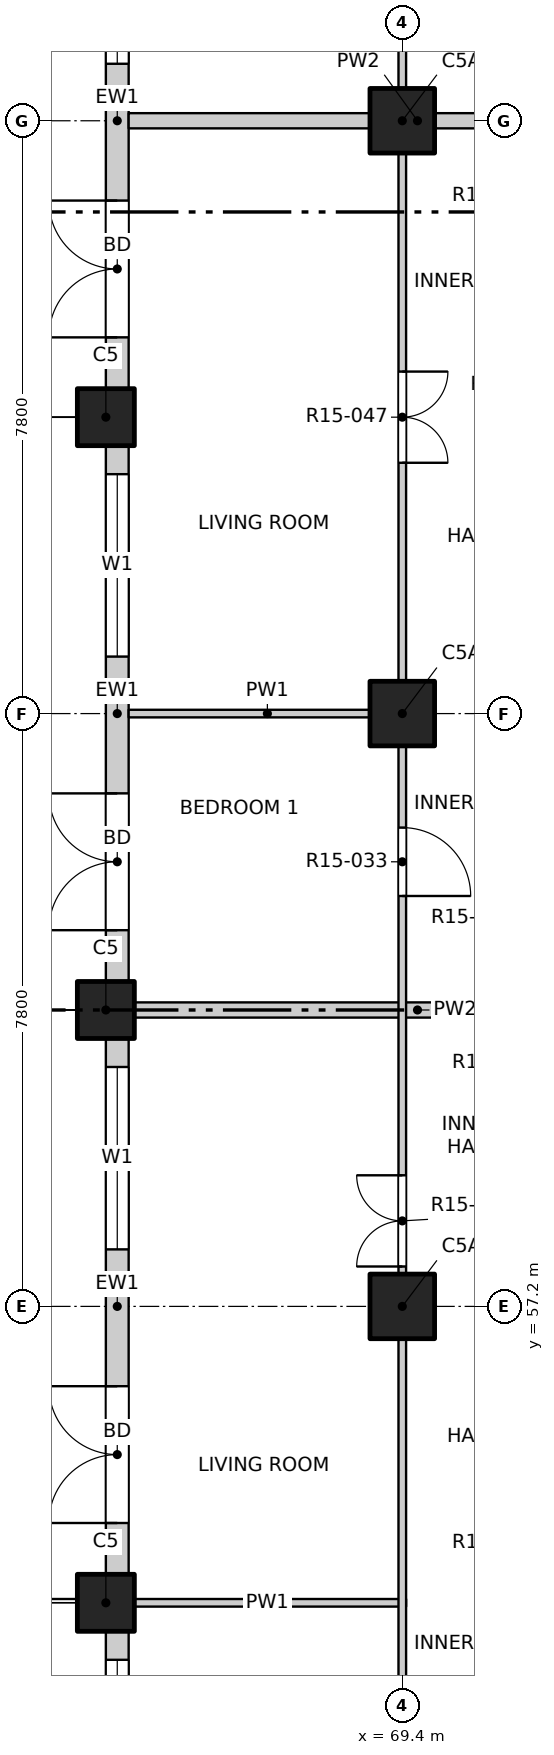
"""IFC4 building model, lengths in metres.
Left out: names, types, materials, properties, quantities, classifications, styles, units other than length and angle.
Written with IfcOpenShell. Run it as: python <this file> out.ifc"""

import sys

from ifc_helpers import new_model, si_unit, direction, frame, frame_2d, origin, origin_2d, place, context, subcontext, project, spatial, rectangle, extrude, element, fill, save


model = new_model("IFC4")
c1 = context("Model", 3, precision=1e-05, world=origin(), true_north=direction((0.0, 1.0)))
c2 = subcontext(c1, "Body", "Model", "MODEL_VIEW")
j1 = project(units=[si_unit("LENGTHUNIT", "METRE"), si_unit("PLANEANGLEUNIT", "RADIAN")], contexts=[c1])
p1 = place(None, origin())
s1 = spatial("IfcSite", under=j1, at=p1, CompositionType="ELEMENT")
p2 = place(p1, origin())
s2 = spatial("IfcBuilding", under=s1, at=p2, CompositionType="ELEMENT")
p3 = place(p2, frame((0.0, 0.0, 158.8)))
s3 = spatial("IfcBuildingStorey", under=s2, at=p3, CompositionType="ELEMENT", Elevation=158.8)
for number, where, z_axis, x_axis in (
    (1, (65.5, 53.3, -0.25), (0.0, 0.0, 1.0), (1.0, 0.0, 0.0)),
    (2, (65.5, 61.1, -0.25), (0.0, 0.0, 1.0), (1.0, 0.0, 0.0)),
    (3, (65.5, 68.9, -0.25), (0.0, 0.0, 1.0), (1.0, 0.0, 0.0)),
):
    element("IfcColumn", number, at=place(p3, frame(where, z_axis=z_axis, x_axis=x_axis)), inside=s3, PredefinedType="COLUMN", context=c2, shape_type="SweptSolid", body=[
        extrude(rectangle(XDim=0.75, YDim=0.75, at=origin_2d()), origin(), (0.0, 0.0, 1.0), 3.4),
    ])
for number, where, z_axis, x_axis in (
    (4, (69.4, 57.2, -0.25), (0.0, 0.0, 1.0), (1.0, 0.0, 0.0)),
    (5, (69.4, 65.0, -0.25), (0.0, 0.0, 1.0), (1.0, 0.0, 0.0)),
    (6, (69.4, 72.8, -0.25), (0.0, 0.0, 1.0), (1.0, 0.0, 0.0)),
):
    element("IfcColumn", number, at=place(p3, frame(where, z_axis=z_axis, x_axis=x_axis)), inside=s3, PredefinedType="COLUMN", context=c2, shape_type="SweptSolid", body=[
        extrude(rectangle(XDim=0.85, YDim=0.85, at=origin_2d()), origin(), (0.0, 0.0, 1.0), 3.4),
    ])
p4 = place(p3, frame((65.65, 49.4, 0.0), z_axis=(0.0, 0.0, 1.0), x_axis=(0.0, 1.0, 0.0)))
e7 = element("IfcWall", 7, at=p4, inside=s3, PredefinedType="SOLIDWALL", context=c2, shape_type="SweptSolid", body=[
    extrude(rectangle(XDim=3.525, YDim=0.3, at=frame_2d((1.763, 0.0))), origin(), (0.0, 0.0, 1.0), 2.7),
])
p5 = place(p4, frame((0.75, 0.0, 0.9)))
e8 = element("IfcOpeningElement", 8, at=p5, cuts=e7, PredefinedType="OPENING", context=c2, shape_type="SweptSolid", body=[
    extrude(rectangle(XDim=2.4, YDim=1.8, at=frame_2d((1.2, 0.9))), frame((0.0, 0.16, 0.0), z_axis=(0.0, -1.0, 0.0), x_axis=(1.0, 0.0, 0.0)), (0.0, 0.0, 1.0), 0.32),
])
p6 = place(p3, frame((65.65, 53.675, 0.0), z_axis=(0.0, 0.0, 1.0), x_axis=(0.0, 1.0, 0.0)))
e9 = element("IfcWall", 9, at=p6, inside=s3, PredefinedType="SOLIDWALL", context=c2, shape_type="SweptSolid", body=[
    extrude(rectangle(XDim=7.05, YDim=0.3, at=frame_2d((3.525, 0.0))), origin(), (0.0, 0.0, 1.0), 2.7),
])
p7 = place(p6, frame((0.675, 0.0, 0.0)))
e10 = element("IfcOpeningElement", 10, at=p7, cuts=e9, PredefinedType="OPENING", context=c2, shape_type="SweptSolid", body=[
    extrude(rectangle(XDim=1.8, YDim=2.4, at=frame_2d((0.9, 1.2))), frame((0.0, 0.16, 0.0), z_axis=(0.0, -1.0, 0.0), x_axis=(1.0, 0.0, 0.0)), (0.0, 0.0, 1.0), 0.32),
])
p8 = place(p6, frame((4.275, 0.0, 0.9)))
e11 = element("IfcOpeningElement", 11, at=p8, cuts=e9, PredefinedType="OPENING", context=c2, shape_type="SweptSolid", body=[
    extrude(rectangle(XDim=2.4, YDim=1.8, at=frame_2d((1.2, 0.9))), frame((0.0, 0.16, 0.0), z_axis=(0.0, -1.0, 0.0), x_axis=(1.0, 0.0, 0.0)), (0.0, 0.0, 1.0), 0.32),
])
p9 = place(p3, frame((65.65, 61.475, 0.0), z_axis=(0.0, 0.0, 1.0), x_axis=(0.0, 1.0, 0.0)))
e12 = element("IfcWall", 12, at=p9, inside=s3, PredefinedType="SOLIDWALL", context=c2, shape_type="SweptSolid", body=[
    extrude(rectangle(XDim=7.05, YDim=0.3, at=frame_2d((3.525, 0.0))), origin(), (0.0, 0.0, 1.0), 2.7),
])
p10 = place(p9, frame((0.675, 0.0, 0.0)))
e13 = element("IfcOpeningElement", 13, at=p10, cuts=e12, PredefinedType="OPENING", context=c2, shape_type="SweptSolid", body=[
    extrude(rectangle(XDim=1.8, YDim=2.4, at=frame_2d((0.9, 1.2))), frame((0.0, 0.16, 0.0), z_axis=(0.0, -1.0, 0.0), x_axis=(1.0, 0.0, 0.0)), (0.0, 0.0, 1.0), 0.32),
])
p11 = place(p9, frame((4.275, 0.0, 0.9)))
e14 = element("IfcOpeningElement", 14, at=p11, cuts=e12, PredefinedType="OPENING", context=c2, shape_type="SweptSolid", body=[
    extrude(rectangle(XDim=2.4, YDim=1.8, at=frame_2d((1.2, 0.9))), frame((0.0, 0.16, 0.0), z_axis=(0.0, -1.0, 0.0), x_axis=(1.0, 0.0, 0.0)), (0.0, 0.0, 1.0), 0.32),
])
p12 = place(p3, frame((65.65, 69.275, 0.0), z_axis=(0.0, 0.0, 1.0), x_axis=(0.0, 1.0, 0.0)))
e15 = element("IfcWall", 15, at=p12, inside=s3, PredefinedType="SOLIDWALL", context=c2, shape_type="SweptSolid", body=[
    extrude(rectangle(XDim=7.05, YDim=0.3, at=frame_2d((3.525, 0.0))), origin(), (0.0, 0.0, 1.0), 2.7),
])
p13 = place(p12, frame((0.675, 0.0, 0.0)))
e16 = element("IfcOpeningElement", 16, at=p13, cuts=e15, PredefinedType="OPENING", context=c2, shape_type="SweptSolid", body=[
    extrude(rectangle(XDim=1.8, YDim=2.4, at=frame_2d((0.9, 1.2))), frame((0.0, 0.16, 0.0), z_axis=(0.0, -1.0, 0.0), x_axis=(1.0, 0.0, 0.0)), (0.0, 0.0, 1.0), 0.32),
])
p14 = place(p12, frame((4.275, 0.0, 0.9)))
e17 = element("IfcOpeningElement", 17, at=p14, cuts=e15, PredefinedType="OPENING", context=c2, shape_type="SweptSolid", body=[
    extrude(rectangle(XDim=2.4, YDim=1.8, at=frame_2d((1.2, 0.9))), frame((0.0, 0.16, 0.0), z_axis=(0.0, -1.0, 0.0), x_axis=(1.0, 0.0, 0.0)), (0.0, 0.0, 1.0), 0.32),
])
p15 = place(p3, frame((65.8, 53.3, 0.0), z_axis=(0.0, 0.0, 1.0), x_axis=(1.0, 0.0, 0.0)))
e18 = element("IfcWall", 18, at=p15, inside=s3, PredefinedType="PARTITIONING", context=c2, shape_type="SweptSolid", body=[
    extrude(rectangle(XDim=3.65, YDim=0.1, at=frame_2d((1.825, 0.0))), origin(), (0.0, 0.0, 1.0), 3.15),
])
p16 = place(p3, frame((65.8, 61.1, 0.0), z_axis=(0.0, 0.0, 1.0), x_axis=(1.0, 0.0, 0.0)))
e19 = element("IfcWall", 19, at=p16, inside=s3, PredefinedType="PARTITIONING", context=c2, shape_type="SweptSolid", body=[
    extrude(rectangle(XDim=7.6, YDim=0.2, at=frame_2d((3.8, 0.0))), origin(), (0.0, 0.0, 1.0), 2.55),
])
p17 = place(p3, frame((65.8, 65.0, 0.0), z_axis=(0.0, 0.0, 1.0), x_axis=(1.0, 0.0, 0.0)))
e20 = element("IfcWall", 20, at=p17, inside=s3, PredefinedType="PARTITIONING", context=c2, shape_type="SweptSolid", body=[
    extrude(rectangle(XDim=3.65, YDim=0.1, at=frame_2d((1.825, 0.0))), origin(), (0.0, 0.0, 1.0), 3.15),
])
p18 = place(p3, frame((65.8, 72.8, 0.0), z_axis=(0.0, 0.0, 1.0), x_axis=(1.0, 0.0, 0.0)))
e21 = element("IfcWall", 21, at=p18, inside=s3, PredefinedType="PARTITIONING", context=c2, shape_type="SweptSolid", body=[
    extrude(rectangle(XDim=7.6, YDim=0.2, at=frame_2d((3.8, 0.0))), origin(), (0.0, 0.0, 1.0), 3.15),
])
p19 = place(p3, frame((69.4, 45.8, 0.0), z_axis=(0.0, 0.0, 1.0), x_axis=(0.0, 1.0, 0.0)))
e22 = element("IfcWall", 22, at=p19, inside=s3, PredefinedType="PARTITIONING", context=c2, shape_type="SweptSolid", body=[
    extrude(rectangle(XDim=38.4, YDim=0.1, at=frame_2d((19.2, 0.0))), origin(), (0.0, 0.0, 1.0), 3.15),
])
p20 = place(p19, frame((1.05, 0.0, 0.0)))
e23 = element("IfcOpeningElement", 23, at=p20, cuts=e22, PredefinedType="OPENING", context=c2, shape_type="SweptSolid", body=[
    extrude(rectangle(XDim=1.2, YDim=2.1, at=frame_2d((0.6, 1.05))), frame((0.0, 0.06, 0.0), z_axis=(0.0, -1.0, 0.0), x_axis=(1.0, 0.0, 0.0)), (0.0, 0.0, 1.0), 0.12),
])
p21 = place(p19, frame((5.1, 0.0, 0.0)))
e24 = element("IfcOpeningElement", 24, at=p21, cuts=e22, PredefinedType="OPENING", context=c2, shape_type="SweptSolid", body=[
    extrude(rectangle(XDim=0.9, YDim=2.1, at=frame_2d((0.45, 1.05))), frame((0.0, 0.06, 0.0), z_axis=(0.0, -1.0, 0.0), x_axis=(1.0, 0.0, 0.0)), (0.0, 0.0, 1.0), 0.12),
])
p22 = place(p19, frame((11.925, 0.0, 0.0)))
e25 = element("IfcOpeningElement", 25, at=p22, cuts=e22, PredefinedType="OPENING", context=c2, shape_type="SweptSolid", body=[
    extrude(rectangle(XDim=1.2, YDim=2.1, at=frame_2d((0.6, 1.05))), frame((0.0, 0.06, 0.0), z_axis=(0.0, -1.0, 0.0), x_axis=(1.0, 0.0, 0.0)), (0.0, 0.0, 1.0), 0.12),
])
p23 = place(p19, frame((16.8, 0.0, 0.0)))
e26 = element("IfcOpeningElement", 26, at=p23, cuts=e22, PredefinedType="OPENING", context=c2, shape_type="SweptSolid", body=[
    extrude(rectangle(XDim=0.9, YDim=2.1, at=frame_2d((0.45, 1.05))), frame((0.0, 0.06, 0.0), z_axis=(0.0, -1.0, 0.0), x_axis=(1.0, 0.0, 0.0)), (0.0, 0.0, 1.0), 0.12),
])
p24 = place(p19, frame((22.5, 0.0, 0.0)))
e27 = element("IfcOpeningElement", 27, at=p24, cuts=e22, PredefinedType="OPENING", context=c2, shape_type="SweptSolid", body=[
    extrude(rectangle(XDim=1.2, YDim=2.1, at=frame_2d((0.6, 1.05))), frame((0.0, 0.06, 0.0), z_axis=(0.0, -1.0, 0.0), x_axis=(1.0, 0.0, 0.0)), (0.0, 0.0, 1.0), 0.12),
])
p25 = place(p19, frame((28.5, 0.0, 0.0)))
e28 = element("IfcOpeningElement", 28, at=p25, cuts=e22, PredefinedType="OPENING", context=c2, shape_type="SweptSolid", body=[
    extrude(rectangle(XDim=0.9, YDim=2.1, at=frame_2d((0.45, 1.05))), frame((0.0, 0.06, 0.0), z_axis=(0.0, -1.0, 0.0), x_axis=(1.0, 0.0, 0.0)), (0.0, 0.0, 1.0), 0.12),
])
p26 = place(p19, frame((32.4, 0.0, 0.0)))
e29 = element("IfcOpeningElement", 29, at=p26, cuts=e22, PredefinedType="OPENING", context=c2, shape_type="SweptSolid", body=[
    extrude(rectangle(XDim=0.9, YDim=2.1, at=frame_2d((0.45, 1.05))), frame((0.0, 0.06, 0.0), z_axis=(0.0, -1.0, 0.0), x_axis=(1.0, 0.0, 0.0)), (0.0, 0.0, 1.0), 0.12),
])
p27 = place(p19, frame((36.15, 0.0, 0.0)))
e30 = element("IfcOpeningElement", 30, at=p27, cuts=e22, PredefinedType="OPENING", context=c2, shape_type="SweptSolid", body=[
    extrude(rectangle(XDim=1.2, YDim=2.1, at=frame_2d((0.6, 1.05))), frame((0.0, 0.06, 0.0), z_axis=(0.0, -1.0, 0.0), x_axis=(1.0, 0.0, 0.0)), (0.0, 0.0, 1.0), 0.12),
])
p28 = place(p5, origin())
e31 = element("IfcWindow", 31, at=p28, inside=s3, PartitioningType="DOUBLE_PANEL_VERTICAL", PredefinedType="WINDOW", context=c2, shape_type="SweptSolid", body=[
    extrude(rectangle(XDim=2.4, YDim=1.8, at=frame_2d((1.2, 0.9))), frame((0.0, 0.03, 0.0), z_axis=(0.0, -1.0, 0.0), x_axis=(1.0, 0.0, 0.0)), (0.0, 0.0, 1.0), 0.06),
])
fill(e8, e31)
p29 = place(p7, origin())
e32 = element("IfcDoor", 32, at=p29, inside=s3, OperationType="DOUBLE_DOOR_SINGLE_SWING", PredefinedType="DOOR", context=c2, shape_type="SweptSolid", body=[
    extrude(rectangle(XDim=1.8, YDim=2.4, at=frame_2d((0.9, 1.2))), frame((0.0, 0.025, 0.0), z_axis=(0.0, -1.0, 0.0), x_axis=(1.0, 0.0, 0.0)), (0.0, 0.0, 1.0), 0.05),
])
fill(e10, e32)
p30 = place(p8, origin())
e33 = element("IfcWindow", 33, at=p30, inside=s3, PartitioningType="DOUBLE_PANEL_VERTICAL", PredefinedType="WINDOW", context=c2, shape_type="SweptSolid", body=[
    extrude(rectangle(XDim=2.4, YDim=1.8, at=frame_2d((1.2, 0.9))), frame((0.0, 0.03, 0.0), z_axis=(0.0, -1.0, 0.0), x_axis=(1.0, 0.0, 0.0)), (0.0, 0.0, 1.0), 0.06),
])
fill(e11, e33)
p31 = place(p10, origin())
e34 = element("IfcDoor", 34, at=p31, inside=s3, OperationType="DOUBLE_DOOR_SINGLE_SWING", PredefinedType="DOOR", context=c2, shape_type="SweptSolid", body=[
    extrude(rectangle(XDim=1.8, YDim=2.4, at=frame_2d((0.9, 1.2))), frame((0.0, 0.025, 0.0), z_axis=(0.0, -1.0, 0.0), x_axis=(1.0, 0.0, 0.0)), (0.0, 0.0, 1.0), 0.05),
])
fill(e13, e34)
p32 = place(p11, origin())
e35 = element("IfcWindow", 35, at=p32, inside=s3, PartitioningType="DOUBLE_PANEL_VERTICAL", PredefinedType="WINDOW", context=c2, shape_type="SweptSolid", body=[
    extrude(rectangle(XDim=2.4, YDim=1.8, at=frame_2d((1.2, 0.9))), frame((0.0, 0.03, 0.0), z_axis=(0.0, -1.0, 0.0), x_axis=(1.0, 0.0, 0.0)), (0.0, 0.0, 1.0), 0.06),
])
fill(e14, e35)
p33 = place(p13, origin())
e36 = element("IfcDoor", 36, at=p33, inside=s3, OperationType="DOUBLE_DOOR_SINGLE_SWING", PredefinedType="DOOR", context=c2, shape_type="SweptSolid", body=[
    extrude(rectangle(XDim=1.8, YDim=2.4, at=frame_2d((0.9, 1.2))), frame((0.0, 0.025, 0.0), z_axis=(0.0, -1.0, 0.0), x_axis=(1.0, 0.0, 0.0)), (0.0, 0.0, 1.0), 0.05),
])
fill(e16, e36)
p34 = place(p14, origin())
e37 = element("IfcWindow", 37, at=p34, inside=s3, PartitioningType="DOUBLE_PANEL_VERTICAL", PredefinedType="WINDOW", context=c2, shape_type="SweptSolid", body=[
    extrude(rectangle(XDim=2.4, YDim=1.8, at=frame_2d((1.2, 0.9))), frame((0.0, 0.03, 0.0), z_axis=(0.0, -1.0, 0.0), x_axis=(1.0, 0.0, 0.0)), (0.0, 0.0, 1.0), 0.06),
])
fill(e17, e37)
p35 = place(p22, origin())
e38 = element("IfcDoor", 38, at=p35, inside=s3, OperationType="DOUBLE_DOOR_SINGLE_SWING", PredefinedType="DOOR", context=c2, shape_type="SweptSolid", body=[
    extrude(rectangle(XDim=1.2, YDim=2.1, at=frame_2d((0.6, 1.05))), frame((0.0, 0.025, 0.0), z_axis=(0.0, -1.0, 0.0), x_axis=(1.0, 0.0, 0.0)), (0.0, 0.0, 1.0), 0.05),
])
fill(e25, e38)
p36 = place(p23, origin())
e39 = element("IfcDoor", 39, at=p36, inside=s3, OperationType="SINGLE_SWING_RIGHT", PredefinedType="DOOR", context=c2, shape_type="SweptSolid", body=[
    extrude(rectangle(XDim=0.9, YDim=2.1, at=frame_2d((0.45, 1.05))), frame((0.0, 0.025, 0.0), z_axis=(0.0, -1.0, 0.0), x_axis=(1.0, 0.0, 0.0)), (0.0, 0.0, 1.0), 0.05),
])
fill(e26, e39)
p37 = place(p24, origin())
e40 = element("IfcDoor", 40, at=p37, inside=s3, OperationType="DOUBLE_DOOR_SINGLE_SWING", PredefinedType="DOOR", context=c2, shape_type="SweptSolid", body=[
    extrude(rectangle(XDim=1.2, YDim=2.1, at=frame_2d((0.6, 1.05))), frame((0.0, 0.025, 0.0), z_axis=(0.0, -1.0, 0.0), x_axis=(1.0, 0.0, 0.0)), (0.0, 0.0, 1.0), 0.05),
])
fill(e27, e40)
save(model, sys.argv[1])
